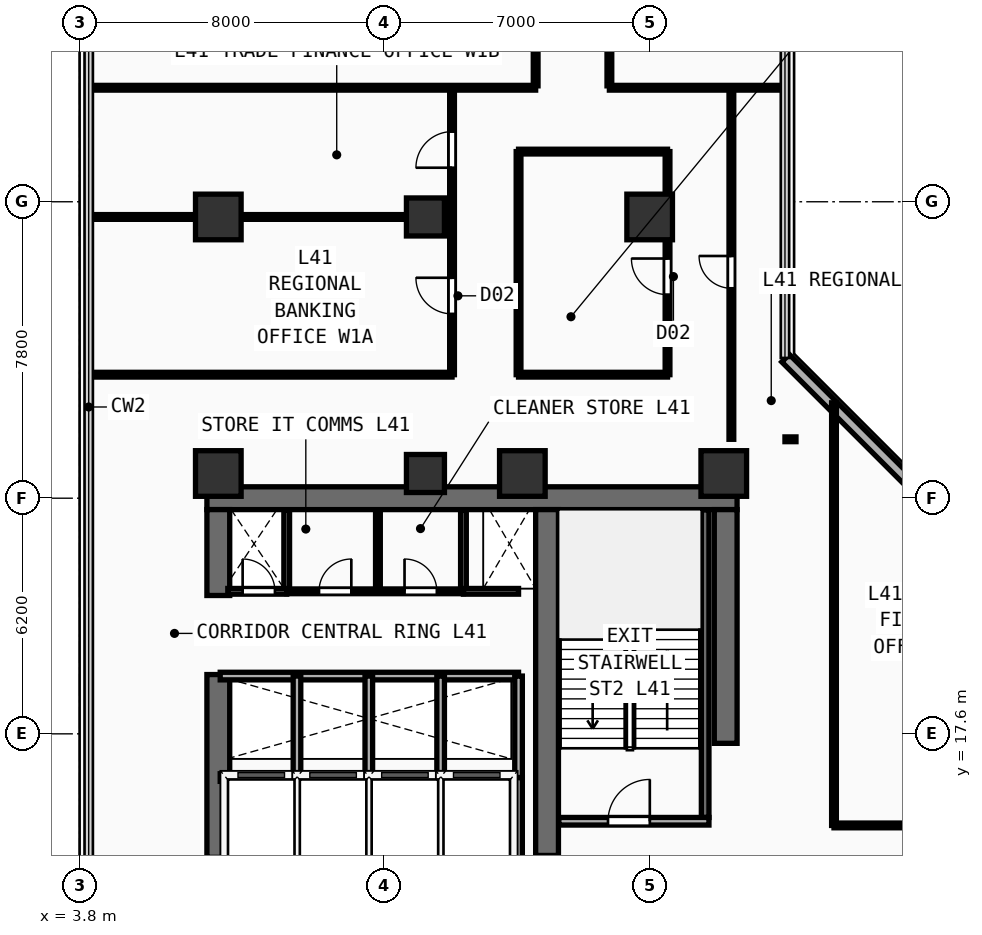
"""IFC4 building model, lengths in metres.
Left out: names, types, materials, properties, quantities, classifications, styles, units other than length and angle.
Written with IfcOpenShell. Run it as: python <this file> out.ifc"""

import sys

from ifc_helpers import new_model, si_unit, direction, frame, frame_2d, origin, origin_2d, place, context, subcontext, project, spatial, rectangle, extrude, element, fill, save


model = new_model("IFC4")
c1 = context("Model", 3, precision=1e-05, world=origin(), true_north=direction((0.0, 1.0)))
c2 = subcontext(c1, "Body", "Model", "MODEL_VIEW")
j1 = project(units=[si_unit("LENGTHUNIT", "METRE"), si_unit("PLANEANGLEUNIT", "RADIAN")], contexts=[c1])
p1 = place(None, origin())
s1 = spatial("IfcSite", under=j1, at=p1, CompositionType="ELEMENT")
p2 = place(p1, origin())
s2 = spatial("IfcBuilding", under=s1, at=p2, CompositionType="ELEMENT")
p3 = place(p2, frame((0.0, 0.0, 161.4)))
s3 = spatial("IfcBuildingStorey", under=s2, at=p3, CompositionType="ELEMENT", Elevation=161.4)
p4 = place(p3, frame((7.15, 23.8, 0.0), z_axis=(0.0, 0.0, 1.0), x_axis=(1.0, 0.0, 0.0)))
e1 = element("IfcWall", 1, at=p4, inside=s3, PredefinedType="SHEAR", context=c2, shape_type="SweptSolid", body=[
    extrude(rectangle(XDim=13.95, YDim=0.6, at=frame_2d((6.975, 0.0))), origin(), (0.0, 0.0, 1.0), 3.56),
])
p5 = place(p3, frame((7.45, 14.35, 0.0), z_axis=(0.0, 0.0, 1.0), x_axis=(0.0, 1.0, 0.0)))
e2 = element("IfcWall", 2, at=p5, inside=s3, PredefinedType="SHEAR", context=c2, shape_type="SweptSolid", body=[
    extrude(rectangle(XDim=4.81, YDim=0.6, at=frame_2d((2.405, 0.0))), origin(), (0.0, 0.0, 1.0), 3.56),
])
p6 = place(p3, frame((7.45, 21.24, 0.0), z_axis=(0.0, 0.0, 1.0), x_axis=(0.0, 1.0, 0.0)))
e3 = element("IfcWall", 3, at=p6, inside=s3, PredefinedType="SHEAR", context=c2, shape_type="SweptSolid", body=[
    extrude(rectangle(XDim=2.26, YDim=0.6, at=frame_2d((1.13, 0.0))), origin(), (0.0, 0.0, 1.0), 3.56),
])
p7 = place(p3, frame((20.8, 17.35, 0.0), z_axis=(0.0, 0.0, 1.0), x_axis=(0.0, 1.0, 0.0)))
e4 = element("IfcWall", 4, at=p7, inside=s3, PredefinedType="SHEAR", context=c2, shape_type="SweptSolid", body=[
    extrude(rectangle(XDim=6.15, YDim=0.6, at=frame_2d((3.075, 0.0))), origin(), (0.0, 0.0, 1.0), 3.56),
])
p8 = place(p3, frame((16.1, 14.4, 0.0), z_axis=(0.0, 0.0, 1.0), x_axis=(0.0, 1.0, 0.0)))
e5 = element("IfcWall", 5, at=p8, inside=s3, PredefinedType="SHEAR", context=c2, shape_type="SweptSolid", body=[
    extrude(rectangle(XDim=9.1, YDim=0.6, at=frame_2d((4.55, 0.0))), origin(), (0.0, 0.0, 1.0), 3.56),
])
for number, where, z_axis, x_axis in (
    (6, (7.45, 24.45, 0.0), (0.0, 0.0, 1.0), (1.0, 0.0, 0.0)),
    (7, (15.45, 24.45, 0.0), (0.0, 0.0, 1.0), (1.0, 0.0, 0.0)),
    (8, (20.75, 24.45, 0.0), (0.0, 0.0, 1.0), (1.0, 0.0, 0.0)),
    (9, (7.45, 31.2, 0.0), (0.0, 0.0, 1.0), (1.0, 0.0, 0.0)),
    (10, (18.8, 31.2, 0.0), (0.0, 0.0, 1.0), (1.0, 0.0, 0.0)),
):
    element("IfcColumn", number, at=place(p3, frame(where, z_axis=z_axis, x_axis=x_axis)), inside=s3, PredefinedType="COLUMN", context=c2, shape_type="SweptSolid", body=[
        extrude(rectangle(XDim=1.2, YDim=1.2, at=origin_2d()), origin(), (0.0, 0.0, 1.0), 3.56),
    ])
for number, where, z_axis, x_axis in (
    (11, (12.9, 24.45, 0.0), (0.0, 0.0, 1.0), (1.0, 0.0, 0.0)),
    (12, (12.9, 31.2, 0.0), (0.0, 0.0, 1.0), (1.0, 0.0, 0.0)),
):
    element("IfcColumn", number, at=place(p3, frame(where, z_axis=z_axis, x_axis=x_axis)), inside=s3, PredefinedType="COLUMN", context=c2, shape_type="SweptSolid", body=[
        extrude(rectangle(XDim=1.0, YDim=1.0, at=origin_2d()), origin(), (0.0, 0.0, 1.0), 3.56),
    ])
p9 = place(p3, frame((28.885, 20.975, 0.0), z_axis=(0.0, 0.0, 1.0), x_axis=(-0.707106781187, 0.707106781187, 0.0)))
e13 = element("IfcWall", 13, at=p9, inside=s3, PredefinedType="SOLIDWALL", context=c2, shape_type="SweptSolid", body=[
    extrude(rectangle(XDim=9.207, YDim=0.28, at=frame_2d((4.603, 0.0))), origin(), (0.0, 0.0, 1.0), 3.56),
])
p10 = place(p3, frame((20.26, 15.4, 0.0), z_axis=(0.0, 0.0, 1.0), x_axis=(0.0, 1.0, 0.0)))
e14 = element("IfcWall", 14, at=p10, inside=s3, PredefinedType="SHEAR", context=c2, shape_type="SweptSolid", body=[
    extrude(rectangle(XDim=8.09, YDim=0.2, at=frame_2d((4.045, 0.0))), origin(), (0.0, 0.0, 1.0), 3.56),
])
p11 = place(p3, frame((16.41, 15.3, 0.0), z_axis=(0.0, 0.0, 1.0), x_axis=(1.0, 0.0, 0.0)))
e15 = element("IfcWall", 15, at=p11, inside=s3, PredefinedType="PARTITIONING", context=c2, shape_type="SweptSolid", body=[
    extrude(rectangle(XDim=3.95, YDim=0.2, at=frame_2d((1.975, 0.0))), origin(), (0.0, 0.0, 1.0), 3.56),
])
p12 = place(p11, frame((1.294, 0.0, 0.0)))
e16 = element("IfcOpeningElement", 16, at=p12, cuts=e15, PredefinedType="OPENING", context=c2, shape_type="SweptSolid", body=[
    extrude(rectangle(XDim=1.1, YDim=2.2, at=frame_2d((0.55, 1.1))), frame((0.0, 0.11, 0.0), z_axis=(0.0, -1.0, 0.0), x_axis=(1.0, 0.0, 0.0)), (0.0, 0.0, 1.0), 0.22),
])
p13 = place(p3, frame((7.5, 16.45, 0.0), z_axis=(0.0, 0.0, 1.0), x_axis=(1.0, 0.0, 0.0)))
e17 = element("IfcWall", 17, at=p13, inside=s3, PredefinedType="PARTITIONING", context=c2, shape_type="SweptSolid", body=[
    extrude(rectangle(XDim=7.85, YDim=0.2, at=frame_2d((3.925, 0.0))), origin(), (0.0, 0.0, 1.0), 3.56),
])
for number, where, z_axis, x_axis in (
    (18, (15.35, 14.22, 0.0), (0.0, 0.0, 1.0), (0.0, 1.0, 0.0)),
    (19, (9.52, 14.22, 0.0), (0.0, 0.0, 1.0), (0.0, 1.0, 0.0)),
    (20, (11.41, 14.22, 0.0), (0.0, 0.0, 1.0), (0.0, 1.0, 0.0)),
    (21, (13.3, 14.22, 0.0), (0.0, 0.0, 1.0), (0.0, 1.0, 0.0)),
):
    element("IfcWall", number, at=place(p3, frame(where, z_axis=z_axis, x_axis=x_axis)), inside=s3, PredefinedType="PARTITIONING", context=c2, shape_type="SweptSolid", body=[
        extrude(rectangle(XDim=2.23, YDim=0.2, at=frame_2d((1.115, 0.0))), origin(), (0.0, 0.0, 1.0), 3.56),
    ])
p14 = place(p3, frame((7.5, 19.12, 0.0), z_axis=(0.0, 0.0, 1.0), x_axis=(1.0, 0.0, 0.0)))
e22 = element("IfcWall", 22, at=p14, inside=s3, PredefinedType="PARTITIONING", context=c2, shape_type="SweptSolid", body=[
    extrude(rectangle(XDim=7.85, YDim=0.2, at=frame_2d((3.925, 0.0))), origin(), (0.0, 0.0, 1.0), 3.56),
])
for number, where, z_axis, x_axis in (
    (23, (15.35, 16.45, 0.0), (0.0, 0.0, 1.0), (0.0, 1.0, 0.0)),
    (24, (9.52, 16.45, 0.0), (0.0, 0.0, 1.0), (0.0, 1.0, 0.0)),
    (25, (11.41, 16.45, 0.0), (0.0, 0.0, 1.0), (0.0, 1.0, 0.0)),
    (26, (13.3, 16.45, 0.0), (0.0, 0.0, 1.0), (0.0, 1.0, 0.0)),
):
    element("IfcWall", number, at=place(p3, frame(where, z_axis=z_axis, x_axis=x_axis)), inside=s3, PredefinedType="PARTITIONING", context=c2, shape_type="SweptSolid", body=[
        extrude(rectangle(XDim=2.67, YDim=0.2, at=frame_2d((1.335, 0.0))), origin(), (0.0, 0.0, 1.0), 3.56),
    ])
for number, where, z_axis, x_axis in (
    (27, (9.25, 21.35, 0.0), (0.0, 0.0, 1.0), (0.0, 1.0, 0.0)),
    (28, (13.9, 21.35, 0.0), (0.0, 0.0, 1.0), (0.0, 1.0, 0.0)),
):
    element("IfcWall", number, at=place(p3, frame(where, z_axis=z_axis, x_axis=x_axis)), inside=s3, PredefinedType="PARTITIONING", context=c2, shape_type="SweptSolid", body=[
        extrude(rectangle(XDim=2.13, YDim=0.15, at=frame_2d((1.065, 0.0))), origin(), (0.0, 0.0, 1.0), 3.56),
    ])
p15 = place(p3, frame((7.7, 21.35, 0.0), z_axis=(0.0, 0.0, 1.0), x_axis=(1.0, 0.0, 0.0)))
e29 = element("IfcWall", 29, at=p15, inside=s3, PredefinedType="PARTITIONING", context=c2, shape_type="SweptSolid", body=[
    extrude(rectangle(XDim=1.55, YDim=0.15, at=frame_2d((0.775, 0.0))), origin(), (0.0, 0.0, 1.0), 3.56),
])
p16 = place(p15, frame((0.39, 0.0, 0.0)))
e30 = element("IfcOpeningElement", 30, at=p16, cuts=e29, PredefinedType="OPENING", context=c2, shape_type="SweptSolid", body=[
    extrude(rectangle(XDim=0.85, YDim=2.15, at=frame_2d((0.425, 1.075))), frame((0.0, 0.085, 0.0), z_axis=(0.0, -1.0, 0.0), x_axis=(1.0, 0.0, 0.0)), (0.0, 0.0, 1.0), 0.17),
])
p17 = place(p3, frame((13.9, 21.35, 0.0), z_axis=(0.0, 0.0, 1.0), x_axis=(1.0, 0.0, 0.0)))
e31 = element("IfcWall", 31, at=p17, inside=s3, PredefinedType="PARTITIONING", context=c2, shape_type="SweptSolid", body=[
    extrude(rectangle(XDim=1.45, YDim=0.15, at=frame_2d((0.725, 0.0))), origin(), (0.0, 0.0, 1.0), 3.56),
])
p18 = place(p3, frame((9.25, 21.35, 0.0), z_axis=(0.0, 0.0, 1.0), x_axis=(1.0, 0.0, 0.0)))
e32 = element("IfcWall", 32, at=p18, inside=s3, PredefinedType="PARTITIONING", context=c2, shape_type="SweptSolid", body=[
    extrude(rectangle(XDim=4.65, YDim=0.125, at=frame_2d((2.325, 0.0))), origin(), (0.0, 0.0, 1.0), 3.56),
])
p19 = place(p18, frame((0.85, 0.0, 0.0)))
e33 = element("IfcOpeningElement", 33, at=p19, cuts=e32, PredefinedType="OPENING", context=c2, shape_type="SweptSolid", body=[
    extrude(rectangle(XDim=0.85, YDim=2.15, at=frame_2d((0.425, 1.075))), frame((0.0, 0.073, 0.0), z_axis=(0.0, -1.0, 0.0), x_axis=(1.0, 0.0, 0.0)), (0.0, 0.0, 1.0), 0.145),
])
p20 = place(p18, frame((3.1, 0.0, 0.0)))
e34 = element("IfcOpeningElement", 34, at=p20, cuts=e32, PredefinedType="OPENING", context=c2, shape_type="SweptSolid", body=[
    extrude(rectangle(XDim=0.85, YDim=2.15, at=frame_2d((0.425, 1.075))), frame((0.0, 0.073, 0.0), z_axis=(0.0, -1.0, 0.0), x_axis=(1.0, 0.0, 0.0)), (0.0, 0.0, 1.0), 0.145),
])
p21 = place(p3, frame((11.65, 21.35, 0.0), z_axis=(0.0, 0.0, 1.0), x_axis=(0.0, 1.0, 0.0)))
e35 = element("IfcWall", 35, at=p21, inside=s3, PredefinedType="PARTITIONING", context=c2, shape_type="SweptSolid", body=[
    extrude(rectangle(XDim=2.13, YDim=0.125, at=frame_2d((1.065, 0.0))), origin(), (0.0, 0.0, 1.0), 3.56),
])
for number, where, z_axis, x_axis in (
    (36, (15.35, 27.05, 0.0), (0.0, 0.0, 1.0), (1.0, 0.0, 0.0)),
    (37, (15.35, 32.92, 0.0), (0.0, 0.0, 1.0), (1.0, 0.0, 0.0)),
):
    element("IfcWall", number, at=place(p3, frame(where, z_axis=z_axis, x_axis=x_axis)), inside=s3, PredefinedType="PARTITIONING", context=c2, shape_type="SweptSolid", body=[
        extrude(rectangle(XDim=3.92, YDim=0.125, at=frame_2d((1.96, 0.0))), origin(), (0.0, 0.0, 1.0), 3.56),
    ])
p22 = place(p3, frame((15.35, 27.05, 0.0), z_axis=(0.0, 0.0, 1.0), x_axis=(0.0, 1.0, 0.0)))
e38 = element("IfcWall", 38, at=p22, inside=s3, PredefinedType="PARTITIONING", context=c2, shape_type="SweptSolid", body=[
    extrude(rectangle(XDim=5.87, YDim=0.125, at=frame_2d((2.935, 0.0))), origin(), (0.0, 0.0, 1.0), 3.56),
])
p23 = place(p3, frame((19.27, 27.05, 0.0), z_axis=(0.0, 0.0, 1.0), x_axis=(0.0, 1.0, 0.0)))
e39 = element("IfcWall", 39, at=p23, inside=s3, PredefinedType="PARTITIONING", context=c2, shape_type="SweptSolid", body=[
    extrude(rectangle(XDim=5.87, YDim=0.125, at=frame_2d((2.935, 0.0))), origin(), (0.0, 0.0, 1.0), 3.56),
])
p24 = place(p23, frame((2.106, 0.0, 0.0)))
e40 = element("IfcOpeningElement", 40, at=p24, cuts=e39, PredefinedType="OPENING", context=c2, shape_type="SweptSolid", body=[
    extrude(rectangle(XDim=0.95, YDim=2.15, at=frame_2d((0.475, 1.075))), frame((0.0, 0.073, 0.0), z_axis=(0.0, -1.0, 0.0), x_axis=(1.0, 0.0, 0.0)), (0.0, 0.0, 1.0), 0.145),
])
p25 = place(p3, frame((13.6, 27.05, 0.0), z_axis=(0.0, 0.0, 1.0), x_axis=(0.0, 1.0, 0.0)))
e41 = element("IfcWall", 41, at=p25, inside=s3, PredefinedType="PARTITIONING", context=c2, shape_type="SweptSolid", body=[
    extrude(rectangle(XDim=7.55, YDim=0.125, at=frame_2d((3.775, 0.0))), origin(), (0.0, 0.0, 1.0), 3.56),
])
p26 = place(p25, frame((1.6, 0.0, 0.0)))
e42 = element("IfcOpeningElement", 42, at=p26, cuts=e41, PredefinedType="OPENING", context=c2, shape_type="SweptSolid", body=[
    extrude(rectangle(XDim=0.95, YDim=2.15, at=frame_2d((0.475, 1.075))), frame((0.0, 0.073, 0.0), z_axis=(0.0, -1.0, 0.0), x_axis=(1.0, 0.0, 0.0)), (0.0, 0.0, 1.0), 0.145),
])
p27 = place(p25, frame((5.446, 0.0, 0.0)))
e43 = element("IfcOpeningElement", 43, at=p27, cuts=e41, PredefinedType="OPENING", context=c2, shape_type="SweptSolid", body=[
    extrude(rectangle(XDim=0.95, YDim=2.15, at=frame_2d((0.475, 1.075))), frame((0.0, 0.073, 0.0), z_axis=(0.0, -1.0, 0.0), x_axis=(1.0, 0.0, 0.0)), (0.0, 0.0, 1.0), 0.145),
])
p28 = place(p3, frame((4.04, 27.05, 0.0), z_axis=(0.0, 0.0, 1.0), x_axis=(1.0, 0.0, 0.0)))
e44 = element("IfcWall", 44, at=p28, inside=s3, PredefinedType="PARTITIONING", context=c2, shape_type="SweptSolid", body=[
    extrude(rectangle(XDim=9.56, YDim=0.125, at=frame_2d((4.78, 0.0))), origin(), (0.0, 0.0, 1.0), 3.56),
])
p29 = place(p3, frame((4.04, 34.6, 0.0), z_axis=(0.0, 0.0, 1.0), x_axis=(1.0, 0.0, 0.0)))
e45 = element("IfcWall", 45, at=p29, inside=s3, PredefinedType="PARTITIONING", context=c2, shape_type="SweptSolid", body=[
    extrude(rectangle(XDim=11.76, YDim=0.125, at=frame_2d((5.88, 0.0))), origin(), (0.0, 0.0, 1.0), 3.56),
])
p30 = place(p3, frame((4.04, 31.2, 0.0), z_axis=(0.0, 0.0, 1.0), x_axis=(1.0, 0.0, 0.0)))
e46 = element("IfcWall", 46, at=p30, inside=s3, PredefinedType="PARTITIONING", context=c2, shape_type="SweptSolid", body=[
    extrude(rectangle(XDim=9.56, YDim=0.125, at=frame_2d((4.78, 0.0))), origin(), (0.0, 0.0, 1.0), 3.11),
])
p31 = place(p3, frame((20.95, 25.35, 0.0), z_axis=(0.0, 0.0, 1.0), x_axis=(0.0, 1.0, 0.0)))
e47 = element("IfcWall", 47, at=p31, inside=s3, PredefinedType="PARTITIONING", context=c2, shape_type="SweptSolid", body=[
    extrude(rectangle(XDim=9.25, YDim=0.125, at=frame_2d((4.625, 0.0))), origin(), (0.0, 0.0, 1.0), 3.56),
])
p32 = place(p31, frame((3.973, 0.0, 0.0)))
e48 = element("IfcOpeningElement", 48, at=p32, cuts=e47, PredefinedType="OPENING", context=c2, shape_type="SweptSolid", body=[
    extrude(rectangle(XDim=0.85, YDim=2.15, at=frame_2d((0.425, 1.075))), frame((0.0, 0.073, 0.0), z_axis=(0.0, -1.0, 0.0), x_axis=(1.0, 0.0, 0.0)), (0.0, 0.0, 1.0), 0.145),
])
p33 = place(p3, frame((22.65, 25.35, 0.0), z_axis=(0.0, 0.0, 1.0), x_axis=(-1.0, 0.0, 0.0)))
e49 = element("IfcWall", 49, at=p33, inside=s3, PredefinedType="PARTITIONING", context=c2, shape_type="SweptSolid", body=[
    extrude(rectangle(XDim=0.29, YDim=0.125, at=frame_2d((0.145, 0.0))), origin(), (0.0, 0.0, 1.0), 3.56),
])
p34 = place(p3, frame((17.74, 34.6, 0.0), z_axis=(0.0, 0.0, 1.0), x_axis=(1.0, 0.0, 0.0)))
e50 = element("IfcWall", 50, at=p34, inside=s3, PredefinedType="PARTITIONING", context=c2, shape_type="SweptSolid", body=[
    extrude(rectangle(XDim=4.62, YDim=0.125, at=frame_2d((2.31, 0.0))), origin(), (0.0, 0.0, 1.0), 3.56),
])
p35 = place(p3, frame((23.65, 15.19, 0.0), z_axis=(0.0, 0.0, 1.0), x_axis=(0.0, 1.0, 0.0)))
e51 = element("IfcWall", 51, at=p35, inside=s3, PredefinedType="PARTITIONING", context=c2, shape_type="SweptSolid", body=[
    extrude(rectangle(XDim=11.12, YDim=0.125, at=frame_2d((5.56, 0.0))), origin(), (0.0, 0.0, 1.0), 3.56),
])
p36 = place(p3, frame((23.65, 15.19, 0.0), z_axis=(0.0, 0.0, 1.0), x_axis=(1.0, 0.0, 0.0)))
e52 = element("IfcWall", 52, at=p36, inside=s3, PredefinedType="PARTITIONING", context=c2, shape_type="SweptSolid", body=[
    extrude(rectangle(XDim=20.6, YDim=0.125, at=frame_2d((10.3, 0.0))), origin(), (0.0, 0.0, 1.0), 3.56),
])
p37 = place(p36, frame((3.54, 0.0, 0.0)))
e53 = element("IfcOpeningElement", 53, at=p37, cuts=e52, PredefinedType="OPENING", context=c2, shape_type="SweptSolid", body=[
    extrude(rectangle(XDim=0.95, YDim=2.15, at=frame_2d((0.475, 1.075))), frame((0.0, 0.073, 0.0), z_axis=(0.0, -1.0, 0.0), x_axis=(1.0, 0.0, 0.0)), (0.0, 0.0, 1.0), 0.145),
])
p38 = place(p36, frame((13.91, 0.0, 0.0)))
e54 = element("IfcOpeningElement", 54, at=p38, cuts=e52, PredefinedType="OPENING", context=c2, shape_type="SweptSolid", body=[
    extrude(rectangle(XDim=0.95, YDim=2.15, at=frame_2d((0.475, 1.075))), frame((0.0, 0.073, 0.0), z_axis=(0.0, -1.0, 0.0), x_axis=(1.0, 0.0, 0.0)), (0.0, 0.0, 1.0), 0.145),
])
p39 = place(p3, frame((15.8, 34.65, 0.0), z_axis=(0.0, 0.0, 1.0), x_axis=(0.0, 1.0, 0.0)))
e55 = element("IfcWall", 55, at=p39, inside=s3, PredefinedType="PARTITIONING", context=c2, shape_type="SweptSolid", body=[
    extrude(rectangle(XDim=8.25, YDim=0.125, at=frame_2d((4.125, 0.0))), origin(), (0.0, 0.0, 1.0), 3.56),
])
p40 = place(p39, frame((3.65, 0.0, 0.0)))
e56 = element("IfcOpeningElement", 56, at=p40, cuts=e55, PredefinedType="OPENING", context=c2, shape_type="SweptSolid", body=[
    extrude(rectangle(XDim=0.95, YDim=2.15, at=frame_2d((0.475, 1.075))), frame((0.0, 0.073, 0.0), z_axis=(0.0, -1.0, 0.0), x_axis=(1.0, 0.0, 0.0)), (0.0, 0.0, 1.0), 0.145),
])
p41 = place(p3, frame((17.74, 34.65, 0.0), z_axis=(0.0, 0.0, 1.0), x_axis=(0.0, 1.0, 0.0)))
e57 = element("IfcWall", 57, at=p41, inside=s3, PredefinedType="PARTITIONING", context=c2, shape_type="SweptSolid", body=[
    extrude(rectangle(XDim=8.25, YDim=0.125, at=frame_2d((4.125, 0.0))), origin(), (0.0, 0.0, 1.0), 3.56),
])
p42 = place(p41, frame((4.215, 0.0, 0.0)))
e58 = element("IfcOpeningElement", 58, at=p42, cuts=e57, PredefinedType="OPENING", context=c2, shape_type="SweptSolid", body=[
    extrude(rectangle(XDim=0.95, YDim=2.15, at=frame_2d((0.475, 1.075))), frame((0.0, 0.073, 0.0), z_axis=(0.0, -1.0, 0.0), x_axis=(1.0, 0.0, 0.0)), (0.0, 0.0, 1.0), 0.145),
])
p43 = place(p12, origin())
e59 = element("IfcDoor", 59, at=p43, inside=s3, OperationType="SINGLE_SWING_RIGHT", PredefinedType="DOOR", context=c2, shape_type="SweptSolid", body=[
    extrude(rectangle(XDim=1.1, YDim=2.2, at=frame_2d((0.55, 1.1))), frame((0.0, 0.025, 0.0), z_axis=(0.0, -1.0, 0.0), x_axis=(1.0, 0.0, 0.0)), (0.0, 0.0, 1.0), 0.05),
])
fill(e16, e59)
p44 = place(p16, origin())
e60 = element("IfcDoor", 60, at=p44, inside=s3, OperationType="SINGLE_SWING_LEFT", PredefinedType="DOOR", context=c2, shape_type="SweptSolid", body=[
    extrude(rectangle(XDim=0.85, YDim=2.15, at=frame_2d((0.425, 1.075))), frame((0.0, 0.025, 0.0), z_axis=(0.0, -1.0, 0.0), x_axis=(1.0, 0.0, 0.0)), (0.0, 0.0, 1.0), 0.05),
])
fill(e30, e60)
p45 = place(p19, origin())
e61 = element("IfcDoor", 61, at=p45, inside=s3, OperationType="SINGLE_SWING_RIGHT", PredefinedType="DOOR", context=c2, shape_type="SweptSolid", body=[
    extrude(rectangle(XDim=0.85, YDim=2.15, at=frame_2d((0.425, 1.075))), frame((0.0, 0.025, 0.0), z_axis=(0.0, -1.0, 0.0), x_axis=(1.0, 0.0, 0.0)), (0.0, 0.0, 1.0), 0.05),
])
fill(e33, e61)
p46 = place(p20, origin())
e62 = element("IfcDoor", 62, at=p46, inside=s3, OperationType="SINGLE_SWING_LEFT", PredefinedType="DOOR", context=c2, shape_type="SweptSolid", body=[
    extrude(rectangle(XDim=0.85, YDim=2.15, at=frame_2d((0.425, 1.075))), frame((0.0, 0.025, 0.0), z_axis=(0.0, -1.0, 0.0), x_axis=(1.0, 0.0, 0.0)), (0.0, 0.0, 1.0), 0.05),
])
fill(e34, e62)
p47 = place(p24, origin())
e63 = element("IfcDoor", 63, at=p47, inside=s3, OperationType="SINGLE_SWING_RIGHT", PredefinedType="DOOR", context=c2, shape_type="SweptSolid", body=[
    extrude(rectangle(XDim=0.95, YDim=2.15, at=frame_2d((0.475, 1.075))), frame((0.0, 0.025, 0.0), z_axis=(0.0, -1.0, 0.0), x_axis=(1.0, 0.0, 0.0)), (0.0, 0.0, 1.0), 0.05),
])
fill(e40, e63)
p48 = place(p26, origin())
e64 = element("IfcDoor", 64, at=p48, inside=s3, OperationType="SINGLE_SWING_RIGHT", PredefinedType="DOOR", context=c2, shape_type="SweptSolid", body=[
    extrude(rectangle(XDim=0.95, YDim=2.15, at=frame_2d((0.475, 1.075))), frame((0.0, 0.025, 0.0), z_axis=(0.0, -1.0, 0.0), x_axis=(1.0, 0.0, 0.0)), (0.0, 0.0, 1.0), 0.05),
])
fill(e42, e64)
p49 = place(p27, origin())
e65 = element("IfcDoor", 65, at=p49, inside=s3, OperationType="SINGLE_SWING_LEFT", PredefinedType="DOOR", context=c2, shape_type="SweptSolid", body=[
    extrude(rectangle(XDim=0.95, YDim=2.15, at=frame_2d((0.475, 1.075))), frame((0.0, 0.025, 0.0), z_axis=(0.0, -1.0, 0.0), x_axis=(1.0, 0.0, 0.0)), (0.0, 0.0, 1.0), 0.05),
])
fill(e43, e65)
p50 = place(p32, origin())
e66 = element("IfcDoor", 66, at=p50, inside=s3, OperationType="SINGLE_SWING_RIGHT", PredefinedType="DOOR", context=c2, shape_type="SweptSolid", body=[
    extrude(rectangle(XDim=0.85, YDim=2.15, at=frame_2d((0.425, 1.075))), frame((0.0, 0.025, 0.0), z_axis=(0.0, -1.0, 0.0), x_axis=(1.0, 0.0, 0.0)), (0.0, 0.0, 1.0), 0.05),
])
fill(e48, e66)
save(model, sys.argv[1])
